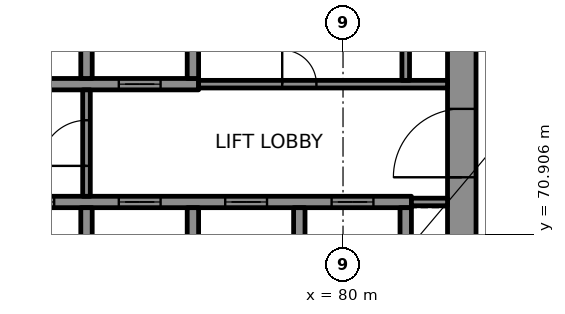
"""IFC4 building model, lengths in metres.
Left out: names, types, materials, properties, quantities, classifications, styles, units other than length and angle.
Written with IfcOpenShell. Run it as: python <this file> out.ifc"""

import sys

from ifc_helpers import new_model, si_unit, direction, frame, frame_2d, origin, place, context, subcontext, project, spatial, rectangle, extrude, element, fill, save


model = new_model("IFC4")
c1 = context("Model", 3, precision=1e-05, world=origin(), true_north=direction((0.0, 1.0)))
c2 = subcontext(c1, "Body", "Model", "MODEL_VIEW")
j1 = project(units=[si_unit("LENGTHUNIT", "METRE"), si_unit("PLANEANGLEUNIT", "RADIAN")], contexts=[c1])
p1 = place(None, origin())
s1 = spatial("IfcSite", under=j1, at=p1, CompositionType="ELEMENT")
p2 = place(p1, origin())
s2 = spatial("IfcBuilding", under=s1, at=p2, CompositionType="ELEMENT")
p3 = place(p2, frame((0.0, 0.0, 274.1)))
s3 = spatial("IfcBuildingStorey", under=s2, at=p3, CompositionType="ELEMENT", Elevation=274.1)
p4 = place(p3, frame((83.125, 69.0, 0.0), z_axis=(0.0, 0.0, 1.0), x_axis=(0.0, 1.0, 0.0)))
e1 = element("IfcWall", 1, at=p4, inside=s3, PredefinedType="SHEAR", context=c2, shape_type="SweptSolid", body=[
    extrude(rectangle(XDim=12.0, YDim=0.75, at=frame_2d((6.0, 0.0))), origin(), (0.0, 0.0, 1.0), 3.3),
])
p5 = place(p4, frame((3.4, 0.0, 0.0)))
e2 = element("IfcOpeningElement", 2, at=p5, cuts=e1, PredefinedType="OPENING", context=c2, shape_type="SweptSolid", body=[
    extrude(rectangle(XDim=1.8, YDim=2.1, at=frame_2d((0.9, 1.05))), frame((0.0, 0.385, 0.0), z_axis=(0.0, -1.0, 0.0), x_axis=(1.0, 0.0, 0.0)), (0.0, 0.0, 1.0), 0.77),
])
p6 = place(p3, frame((70.3, 71.75, 0.0), z_axis=(0.0, 0.0, 1.0), x_axis=(1.0, 0.0, 0.0)))
e3 = element("IfcWall", 3, at=p6, inside=s3, PredefinedType="SHEAR", context=c2, shape_type="SweptSolid", body=[
    extrude(rectangle(XDim=11.5, YDim=0.3, at=frame_2d((5.75, 0.0))), origin(), (0.0, 0.0, 1.0), 3.3),
])
p7 = place(p6, frame((1.0, 0.0, 0.0)))
e4 = element("IfcOpeningElement", 4, at=p7, cuts=e3, PredefinedType="OPENING", context=c2, shape_type="SweptSolid", body=[
    extrude(rectangle(XDim=1.1, YDim=2.1, at=frame_2d((0.55, 1.05))), frame((0.0, 0.16, 0.0), z_axis=(0.0, -1.0, 0.0), x_axis=(1.0, 0.0, 0.0)), (0.0, 0.0, 1.0), 0.32),
])
p8 = place(p6, frame((3.8, 0.0, 0.0)))
e5 = element("IfcOpeningElement", 5, at=p8, cuts=e3, PredefinedType="OPENING", context=c2, shape_type="SweptSolid", body=[
    extrude(rectangle(XDim=1.1, YDim=2.1, at=frame_2d((0.55, 1.05))), frame((0.0, 0.16, 0.0), z_axis=(0.0, -1.0, 0.0), x_axis=(1.0, 0.0, 0.0)), (0.0, 0.0, 1.0), 0.32),
])
p9 = place(p6, frame((6.6, 0.0, 0.0)))
e6 = element("IfcOpeningElement", 6, at=p9, cuts=e3, PredefinedType="OPENING", context=c2, shape_type="SweptSolid", body=[
    extrude(rectangle(XDim=1.1, YDim=2.1, at=frame_2d((0.55, 1.05))), frame((0.0, 0.16, 0.0), z_axis=(0.0, -1.0, 0.0), x_axis=(1.0, 0.0, 0.0)), (0.0, 0.0, 1.0), 0.32),
])
p10 = place(p6, frame((9.4, 0.0, 0.0)))
e7 = element("IfcOpeningElement", 7, at=p10, cuts=e3, PredefinedType="OPENING", context=c2, shape_type="SweptSolid", body=[
    extrude(rectangle(XDim=1.1, YDim=2.1, at=frame_2d((0.55, 1.05))), frame((0.0, 0.16, 0.0), z_axis=(0.0, -1.0, 0.0), x_axis=(1.0, 0.0, 0.0)), (0.0, 0.0, 1.0), 0.32),
])
p11 = place(p3, frame((70.3, 74.85, 0.0), z_axis=(0.0, 0.0, 1.0), x_axis=(1.0, 0.0, 0.0)))
e8 = element("IfcWall", 8, at=p11, inside=s3, PredefinedType="SHEAR", context=c2, shape_type="SweptSolid", body=[
    extrude(rectangle(XDim=5.9, YDim=0.3, at=frame_2d((2.95, 0.0))), origin(), (0.0, 0.0, 1.0), 3.3),
])
p12 = place(p11, frame((3.8, 0.0, 0.0)))
e9 = element("IfcOpeningElement", 9, at=p12, cuts=e8, PredefinedType="OPENING", context=c2, shape_type="SweptSolid", body=[
    extrude(rectangle(XDim=1.1, YDim=2.1, at=frame_2d((0.55, 1.05))), frame((0.0, 0.16, 0.0), z_axis=(0.0, -1.0, 0.0), x_axis=(1.0, 0.0, 0.0)), (0.0, 0.0, 1.0), 0.32),
])
for number, where, z_axis, x_axis in (
    (10, (73.25, 69.0, 0.0), (0.0, 0.0, 1.0), (0.0, 1.0, 0.0)),
    (11, (73.25, 75.0, 0.0), (0.0, 0.0, 1.0), (0.0, 1.0, 0.0)),
    (12, (76.05, 69.0, 0.0), (0.0, 0.0, 1.0), (0.0, 1.0, 0.0)),
    (13, (76.05, 75.0, 0.0), (0.0, 0.0, 1.0), (0.0, 1.0, 0.0)),
    (14, (78.85, 69.0, 0.0), (0.0, 0.0, 1.0), (0.0, 1.0, 0.0)),
    (15, (81.65, 69.0, 0.0), (0.0, 0.0, 1.0), (0.0, 1.0, 0.0)),
):
    element("IfcWall", number, at=place(p3, frame(where, z_axis=z_axis, x_axis=x_axis)), inside=s3, PredefinedType="SHEAR", context=c2, shape_type="SweptSolid", body=[
        extrude(rectangle(XDim=2.6, YDim=0.3, at=frame_2d((1.3, 0.0))), origin(), (0.0, 0.0, 1.0), 3.3),
    ])
p13 = place(p3, frame((81.8, 71.75, 0.0), z_axis=(0.0, 0.0, 1.0), x_axis=(1.0, 0.0, 0.0)))
e16 = element("IfcWall", 16, at=p13, inside=s3, PredefinedType="PARTITIONING", context=c2, shape_type="SweptSolid", body=[
    extrude(rectangle(XDim=0.95, YDim=0.2, at=frame_2d((0.475, 0.0))), origin(), (0.0, 0.0, 1.0), 3.3),
])
p14 = place(p3, frame((76.2, 74.85, 0.0), z_axis=(0.0, 0.0, 1.0), x_axis=(1.0, 0.0, 0.0)))
e17 = element("IfcWall", 17, at=p14, inside=s3, PredefinedType="PARTITIONING", context=c2, shape_type="SweptSolid", body=[
    extrude(rectangle(XDim=6.55, YDim=0.2, at=frame_2d((3.275, 0.0))), origin(), (0.0, 0.0, 1.0), 3.3),
])
p15 = place(p14, frame((2.2, 0.0, 0.0)))
e18 = element("IfcOpeningElement", 18, at=p15, cuts=e17, PredefinedType="OPENING", context=c2, shape_type="SweptSolid", body=[
    extrude(rectangle(XDim=0.9, YDim=2.1, at=frame_2d((0.45, 1.05))), frame((0.0, 0.11, 0.0), z_axis=(0.0, -1.0, 0.0), x_axis=(1.0, 0.0, 0.0)), (0.0, 0.0, 1.0), 0.22),
])
p16 = place(p3, frame((73.25, 71.9, 0.0), z_axis=(0.0, 0.0, 1.0), x_axis=(0.0, 1.0, 0.0)))
e19 = element("IfcWall", 19, at=p16, inside=s3, PredefinedType="PARTITIONING", context=c2, shape_type="SweptSolid", body=[
    extrude(rectangle(XDim=2.8, YDim=0.2, at=frame_2d((1.4, 0.0))), origin(), (0.0, 0.0, 1.0), 3.3),
])
p17 = place(p16, frame((0.8, 0.0, 0.0)))
e20 = element("IfcOpeningElement", 20, at=p17, cuts=e19, PredefinedType="OPENING", context=c2, shape_type="SweptSolid", body=[
    extrude(rectangle(XDim=1.2, YDim=2.1, at=frame_2d((0.6, 1.05))), frame((0.0, 0.11, 0.0), z_axis=(0.0, -1.0, 0.0), x_axis=(1.0, 0.0, 0.0)), (0.0, 0.0, 1.0), 0.22),
])
p18 = place(p3, frame((81.65, 74.95, 0.0), z_axis=(0.0, 0.0, 1.0), x_axis=(0.0, 1.0, 0.0)))
e21 = element("IfcWall", 21, at=p18, inside=s3, PredefinedType="PARTITIONING", context=c2, shape_type="SweptSolid", body=[
    extrude(rectangle(XDim=2.65, YDim=0.2, at=frame_2d((1.325, 0.0))), origin(), (0.0, 0.0, 1.0), 3.3),
])
p19 = place(p7, origin())
e22 = element("IfcDoor", 22, at=p19, inside=s3, OperationType="DOUBLE_DOOR_SLIDING", PredefinedType="DOOR", context=c2, shape_type="SweptSolid", body=[
    extrude(rectangle(XDim=1.1, YDim=2.1, at=frame_2d((0.55, 1.05))), frame((0.0, 0.025, 0.0), z_axis=(0.0, -1.0, 0.0), x_axis=(1.0, 0.0, 0.0)), (0.0, 0.0, 1.0), 0.05),
])
fill(e4, e22)
p20 = place(p8, origin())
e23 = element("IfcDoor", 23, at=p20, inside=s3, OperationType="DOUBLE_DOOR_SLIDING", PredefinedType="DOOR", context=c2, shape_type="SweptSolid", body=[
    extrude(rectangle(XDim=1.1, YDim=2.1, at=frame_2d((0.55, 1.05))), frame((0.0, 0.025, 0.0), z_axis=(0.0, -1.0, 0.0), x_axis=(1.0, 0.0, 0.0)), (0.0, 0.0, 1.0), 0.05),
])
fill(e5, e23)
p21 = place(p9, origin())
e24 = element("IfcDoor", 24, at=p21, inside=s3, OperationType="DOUBLE_DOOR_SLIDING", PredefinedType="DOOR", context=c2, shape_type="SweptSolid", body=[
    extrude(rectangle(XDim=1.1, YDim=2.1, at=frame_2d((0.55, 1.05))), frame((0.0, 0.025, 0.0), z_axis=(0.0, -1.0, 0.0), x_axis=(1.0, 0.0, 0.0)), (0.0, 0.0, 1.0), 0.05),
])
fill(e6, e24)
p22 = place(p10, origin())
e25 = element("IfcDoor", 25, at=p22, inside=s3, OperationType="DOUBLE_DOOR_SLIDING", PredefinedType="DOOR", context=c2, shape_type="SweptSolid", body=[
    extrude(rectangle(XDim=1.1, YDim=2.1, at=frame_2d((0.55, 1.05))), frame((0.0, 0.025, 0.0), z_axis=(0.0, -1.0, 0.0), x_axis=(1.0, 0.0, 0.0)), (0.0, 0.0, 1.0), 0.05),
])
fill(e7, e25)
p23 = place(p12, origin())
e26 = element("IfcDoor", 26, at=p23, inside=s3, OperationType="DOUBLE_DOOR_SLIDING", PredefinedType="DOOR", context=c2, shape_type="SweptSolid", body=[
    extrude(rectangle(XDim=1.1, YDim=2.1, at=frame_2d((0.55, 1.05))), frame((0.0, 0.025, 0.0), z_axis=(0.0, -1.0, 0.0), x_axis=(1.0, 0.0, 0.0)), (0.0, 0.0, 1.0), 0.05),
])
fill(e9, e26)
p24 = place(p17, origin())
e27 = element("IfcDoor", 27, at=p24, inside=s3, OperationType="SINGLE_SWING_LEFT", PredefinedType="DOOR", context=c2, shape_type="SweptSolid", body=[
    extrude(rectangle(XDim=1.2, YDim=2.1, at=frame_2d((0.6, 1.05))), frame((0.0, 0.025, 0.0), z_axis=(0.0, -1.0, 0.0), x_axis=(1.0, 0.0, 0.0)), (0.0, 0.0, 1.0), 0.05),
])
fill(e20, e27)
p25 = place(p5, origin())
e28 = element("IfcDoor", 28, at=p25, inside=s3, OperationType="SINGLE_SWING_LEFT", PredefinedType="DOOR", context=c2, shape_type="SweptSolid", body=[
    extrude(rectangle(XDim=1.8, YDim=2.1, at=frame_2d((0.9, 1.05))), frame((0.0, 0.095, 0.0), z_axis=(0.0, -1.0, 0.0), x_axis=(1.0, 0.0, 0.0)), (0.0, 0.0, 1.0), 0.19),
])
fill(e2, e28)
p26 = place(p15, origin())
e29 = element("IfcDoor", 29, at=p26, inside=s3, OperationType="SINGLE_SWING_LEFT", PredefinedType="DOOR", context=c2, shape_type="SweptSolid", body=[
    extrude(rectangle(XDim=0.9, YDim=2.1, at=frame_2d((0.45, 1.05))), frame((0.0, 0.025, 0.0), z_axis=(0.0, -1.0, 0.0), x_axis=(1.0, 0.0, 0.0)), (0.0, 0.0, 1.0), 0.05),
])
fill(e18, e29)
save(model, sys.argv[1])
